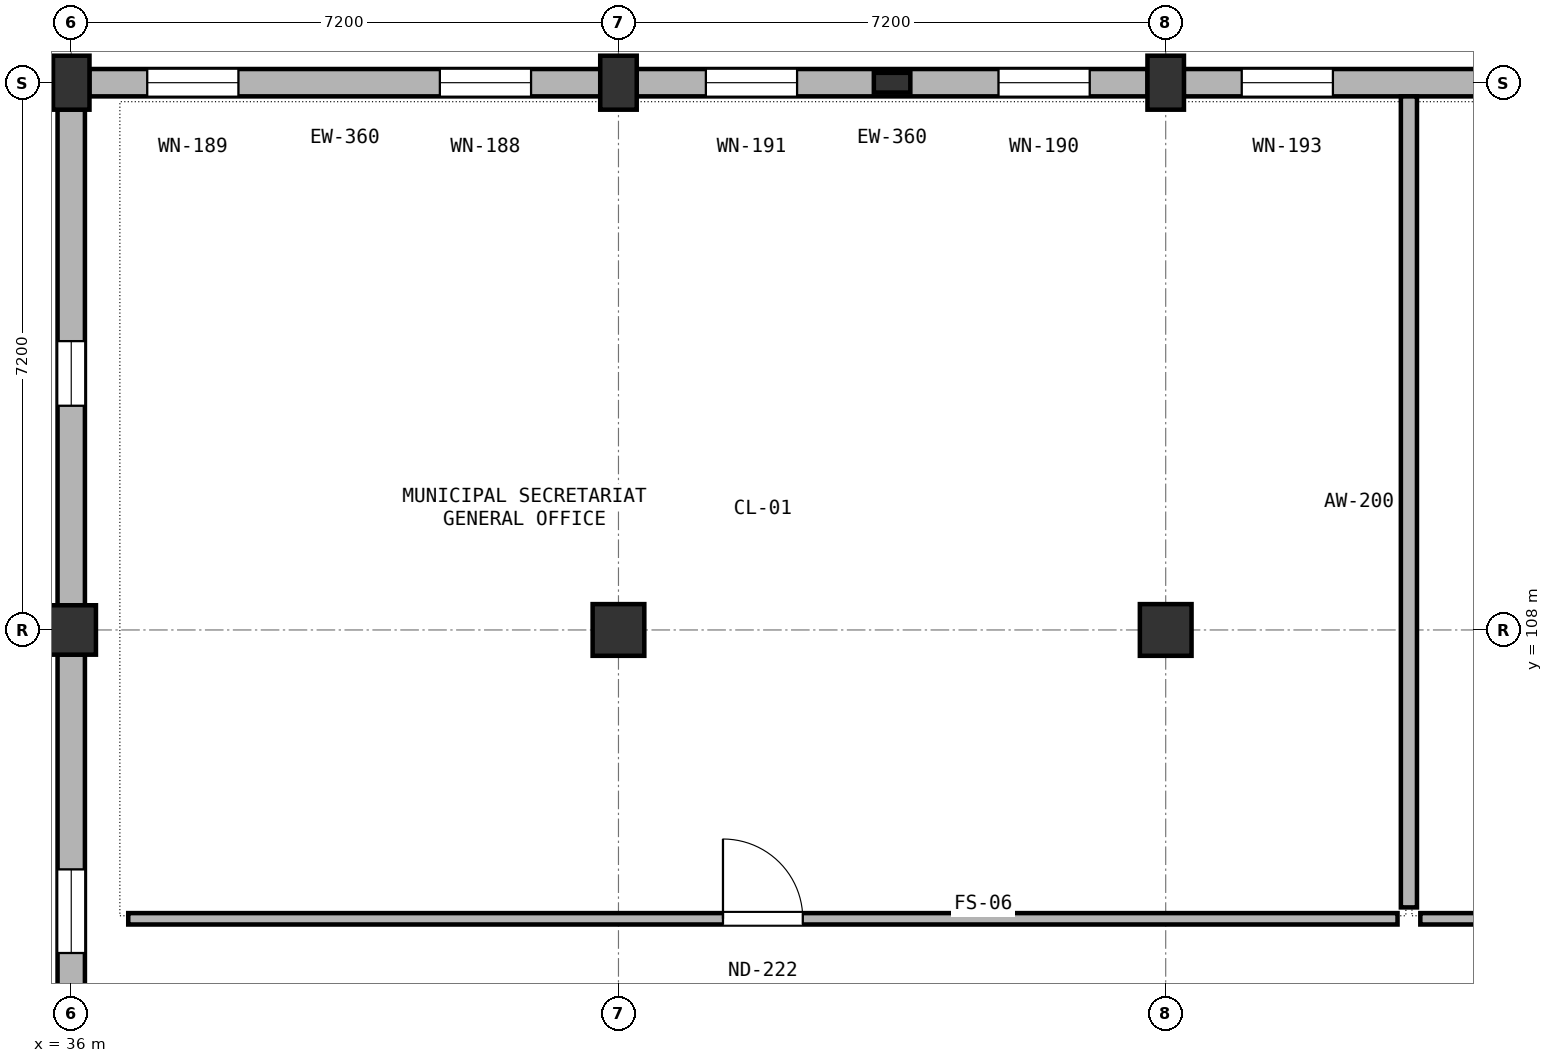
"""IFC4 building model, lengths in metres.
Left out: names, types, materials, properties, quantities, classifications, styles, units other than length and angle.
Written with IfcOpenShell. Run it as: python <this file> out.ifc"""

import sys

from ifc_helpers import new_model, si_unit, direction, frame, frame_2d, origin, origin_2d, place, context, subcontext, project, spatial, rectangle, extrude, element, fill, save


model = new_model("IFC4")
c1 = context("Model", 3, precision=1e-05, world=origin(), true_north=direction((0.0, 1.0)))
c2 = subcontext(c1, "Body", "Model", "MODEL_VIEW")
j1 = project(units=[si_unit("LENGTHUNIT", "METRE"), si_unit("PLANEANGLEUNIT", "RADIAN")], contexts=[c1])
p1 = place(None, origin())
s1 = spatial("IfcSite", under=j1, at=p1, CompositionType="ELEMENT")
p2 = place(p1, origin())
s2 = spatial("IfcBuilding", under=s1, at=p2, CompositionType="ELEMENT")
p3 = place(p2, frame((0.0, 0.0, 26.4)))
s3 = spatial("IfcBuildingStorey", under=s2, at=p3, CompositionType="ELEMENT", Elevation=26.4)
p4 = place(p3, frame((36.0, 108.0, 0.0), z_axis=(0.0, 0.0, 1.0), x_axis=(1.0, 0.0, 0.0)))
e1 = element("IfcColumn", 1, at=p4, inside=s3, PredefinedType="COLUMN", context=c2, shape_type="SweptSolid", body=[
    extrude(rectangle(XDim=0.65, YDim=0.65, at=origin_2d()), origin(), (0.0, 0.0, 1.0), 3.9),
])
p5 = place(p3, frame((36.0, 115.2, 0.0), z_axis=(0.0, 0.0, 1.0), x_axis=(1.0, 0.0, 0.0)))
e2 = element("IfcColumn", 2, at=p5, inside=s3, PredefinedType="COLUMN", context=c2, shape_type="SweptSolid", body=[
    extrude(rectangle(XDim=0.48, YDim=0.71, at=origin_2d()), origin(), (0.0, 0.0, 1.0), 3.9),
])
p6 = place(p3, frame((43.2, 108.0, 0.0), z_axis=(0.0, 0.0, 1.0), x_axis=(1.0, 0.0, 0.0)))
e3 = element("IfcColumn", 3, at=p6, inside=s3, PredefinedType="COLUMN", context=c2, shape_type="SweptSolid", body=[
    extrude(rectangle(XDim=0.68, YDim=0.68, at=origin_2d()), origin(), (0.0, 0.0, 1.0), 3.9),
])
p7 = place(p3, frame((43.2, 115.2, 0.0), z_axis=(0.0, 0.0, 1.0), x_axis=(1.0, 0.0, 0.0)))
e4 = element("IfcColumn", 4, at=p7, inside=s3, PredefinedType="COLUMN", context=c2, shape_type="SweptSolid", body=[
    extrude(rectangle(XDim=0.48, YDim=0.71, at=origin_2d()), origin(), (0.0, 0.0, 1.0), 3.9),
])
p8 = place(p3, frame((50.4, 108.0, 0.0), z_axis=(0.0, 0.0, 1.0), x_axis=(1.0, 0.0, 0.0)))
e5 = element("IfcColumn", 5, at=p8, inside=s3, PredefinedType="COLUMN", context=c2, shape_type="SweptSolid", body=[
    extrude(rectangle(XDim=0.68, YDim=0.68, at=origin_2d()), origin(), (0.0, 0.0, 1.0), 3.9),
])
p9 = place(p3, frame((50.4, 115.2, 0.0), z_axis=(0.0, 0.0, 1.0), x_axis=(1.0, 0.0, 0.0)))
e6 = element("IfcColumn", 6, at=p9, inside=s3, PredefinedType="COLUMN", context=c2, shape_type="SweptSolid", body=[
    extrude(rectangle(XDim=0.48, YDim=0.71, at=origin_2d()), origin(), (0.0, 0.0, 1.0), 3.9),
])
p10 = place(p3, frame((46.8, 115.2, 0.0), z_axis=(0.0, 0.0, 1.0), x_axis=(1.0, 0.0, 0.0)))
e7 = element("IfcColumn", 7, at=p10, inside=s3, PredefinedType="PILASTER", context=c2, shape_type="SweptSolid", body=[
    extrude(rectangle(XDim=0.48, YDim=0.26, at=origin_2d()), origin(), (0.0, 0.0, 1.0), 3.9),
])
p11 = place(p3, frame((42.962, 115.2, 0.0), z_axis=(0.0, 0.0, 1.0), x_axis=(-1.0, 0.0, 0.0)))
e8 = element("IfcWall", 8, at=p11, inside=s3, PredefinedType="SOLIDWALL", context=c2, shape_type="SweptSolid", body=[
    extrude(rectangle(XDim=6.724, YDim=0.36, at=frame_2d((3.362, 0.0))), origin(), (0.0, 0.0, 1.0), 2.74),
])
p12 = place(p11, frame((0.912, 0.0, 0.7)))
e9 = element("IfcOpeningElement", 9, at=p12, cuts=e8, PredefinedType="OPENING", context=c2, shape_type="SweptSolid", body=[
    extrude(rectangle(XDim=1.2, YDim=1.84, at=frame_2d((0.6, 0.92))), frame((0.0, 0.19, 0.0), z_axis=(0.0, -1.0, 0.0), x_axis=(1.0, 0.0, 0.0)), (0.0, 0.0, 1.0), 0.38),
])
p13 = place(p11, frame((4.762, 0.0, 0.7)))
e10 = element("IfcOpeningElement", 10, at=p13, cuts=e8, PredefinedType="OPENING", context=c2, shape_type="SweptSolid", body=[
    extrude(rectangle(XDim=1.2, YDim=1.84, at=frame_2d((0.6, 0.92))), frame((0.0, 0.19, 0.0), z_axis=(0.0, -1.0, 0.0), x_axis=(1.0, 0.0, 0.0)), (0.0, 0.0, 1.0), 0.38),
])
p14 = place(p3, frame((50.162, 115.2, 0.0), z_axis=(0.0, 0.0, 1.0), x_axis=(-1.0, 0.0, 0.0)))
e11 = element("IfcWall", 11, at=p14, inside=s3, PredefinedType="SOLIDWALL", context=c2, shape_type="SweptSolid", body=[
    extrude(rectangle(XDim=6.724, YDim=0.36, at=frame_2d((3.362, 0.0))), origin(), (0.0, 0.0, 1.0), 2.74),
])
p15 = place(p14, frame((0.762, 0.0, 0.7)))
e12 = element("IfcOpeningElement", 12, at=p15, cuts=e11, PredefinedType="OPENING", context=c2, shape_type="SweptSolid", body=[
    extrude(rectangle(XDim=1.2, YDim=1.84, at=frame_2d((0.6, 0.92))), frame((0.0, 0.19, 0.0), z_axis=(0.0, -1.0, 0.0), x_axis=(1.0, 0.0, 0.0)), (0.0, 0.0, 1.0), 0.38),
])
p16 = place(p14, frame((4.612, 0.0, 0.7)))
e13 = element("IfcOpeningElement", 13, at=p16, cuts=e11, PredefinedType="OPENING", context=c2, shape_type="SweptSolid", body=[
    extrude(rectangle(XDim=1.2, YDim=1.84, at=frame_2d((0.6, 0.92))), frame((0.0, 0.19, 0.0), z_axis=(0.0, -1.0, 0.0), x_axis=(1.0, 0.0, 0.0)), (0.0, 0.0, 1.0), 0.38),
])
p17 = place(p3, frame((57.362, 115.2, 0.0), z_axis=(0.0, 0.0, 1.0), x_axis=(-1.0, 0.0, 0.0)))
e14 = element("IfcWall", 14, at=p17, inside=s3, PredefinedType="SOLIDWALL", context=c2, shape_type="SweptSolid", body=[
    extrude(rectangle(XDim=6.724, YDim=0.36, at=frame_2d((3.362, 0.0))), origin(), (0.0, 0.0, 1.0), 2.74),
])
p18 = place(p17, frame((0.912, 0.0, 0.7)))
e15 = element("IfcOpeningElement", 15, at=p18, cuts=e14, PredefinedType="OPENING", context=c2, shape_type="SweptSolid", body=[
    extrude(rectangle(XDim=1.2, YDim=1.84, at=frame_2d((0.6, 0.92))), frame((0.0, 0.19, 0.0), z_axis=(0.0, -1.0, 0.0), x_axis=(1.0, 0.0, 0.0)), (0.0, 0.0, 1.0), 0.38),
])
p19 = place(p17, frame((4.762, 0.0, 0.7)))
e16 = element("IfcOpeningElement", 16, at=p19, cuts=e14, PredefinedType="OPENING", context=c2, shape_type="SweptSolid", body=[
    extrude(rectangle(XDim=1.2, YDim=1.84, at=frame_2d((0.6, 0.92))), frame((0.0, 0.19, 0.0), z_axis=(0.0, -1.0, 0.0), x_axis=(1.0, 0.0, 0.0)), (0.0, 0.0, 1.0), 0.38),
])
p20 = place(p3, frame((36.0, 101.123, 0.0), z_axis=(0.0, 0.0, 1.0), x_axis=(0.0, 1.0, 0.0)))
e17 = element("IfcWall", 17, at=p20, inside=s3, PredefinedType="SOLIDWALL", context=c2, shape_type="SweptSolid", body=[
    extrude(rectangle(XDim=6.554, YDim=0.36, at=frame_2d((3.277, 0.0))), origin(), (0.0, 0.0, 1.0), 2.74),
])
p21 = place(p20, frame((2.627, 0.0, 0.7)))
e18 = element("IfcOpeningElement", 18, at=p21, cuts=e17, PredefinedType="OPENING", context=c2, shape_type="SweptSolid", body=[
    extrude(rectangle(XDim=1.1, YDim=1.89, at=frame_2d((0.55, 0.945))), frame((0.0, 0.19, 0.0), z_axis=(0.0, -1.0, 0.0), x_axis=(1.0, 0.0, 0.0)), (0.0, 0.0, 1.0), 0.38),
])
p22 = place(p3, frame((36.0, 108.323, 0.0), z_axis=(0.0, 0.0, 1.0), x_axis=(0.0, 1.0, 0.0)))
e19 = element("IfcWall", 19, at=p22, inside=s3, PredefinedType="SOLIDWALL", context=c2, shape_type="SweptSolid", body=[
    extrude(rectangle(XDim=6.524, YDim=0.36, at=frame_2d((3.262, 0.0))), origin(), (0.0, 0.0, 1.0), 2.74),
])
p23 = place(p22, frame((2.627, 0.0, 0.7)))
e20 = element("IfcOpeningElement", 20, at=p23, cuts=e19, PredefinedType="OPENING", context=c2, shape_type="SweptSolid", body=[
    extrude(rectangle(XDim=0.85, YDim=1.89, at=frame_2d((0.425, 0.945))), frame((0.0, 0.19, 0.0), z_axis=(0.0, -1.0, 0.0), x_axis=(1.0, 0.0, 0.0)), (0.0, 0.0, 1.0), 0.38),
])
p24 = place(p3, frame((36.75, 104.2, 0.0), z_axis=(0.0, 0.0, 1.0), x_axis=(1.0, 0.0, 0.0)))
e21 = element("IfcWall", 21, at=p24, inside=s3, PredefinedType="PARTITIONING", context=c2, shape_type="SweptSolid", body=[
    extrude(rectangle(XDim=16.7, YDim=0.15, at=frame_2d((8.35, 0.0))), origin(), (0.0, 0.0, 1.0), 2.78),
])
p25 = place(p24, frame((7.825, 0.0, 0.0)))
e22 = element("IfcOpeningElement", 22, at=p25, cuts=e21, PredefinedType="OPENING", context=c2, shape_type="SweptSolid", body=[
    extrude(rectangle(XDim=1.05, YDim=2.15, at=frame_2d((0.525, 1.075))), frame((0.0, 0.085, 0.0), z_axis=(0.0, -1.0, 0.0), x_axis=(1.0, 0.0, 0.0)), (0.0, 0.0, 1.0), 0.17),
])
p26 = place(p3, frame((53.75, 104.2, 0.0), z_axis=(0.0, 0.0, 1.0), x_axis=(1.0, 0.0, 0.0)))
e23 = element("IfcWall", 23, at=p26, inside=s3, PredefinedType="PARTITIONING", context=c2, shape_type="SweptSolid", body=[
    extrude(rectangle(XDim=16.1, YDim=0.15, at=frame_2d((8.05, 0.0))), origin(), (0.0, 0.0, 1.0), 2.78),
])
p27 = place(p26, frame((7.35, 0.0, 0.0)))
e24 = element("IfcOpeningElement", 24, at=p27, cuts=e23, PredefinedType="OPENING", context=c2, shape_type="SweptSolid", body=[
    extrude(rectangle(XDim=1.4, YDim=2.2, at=frame_2d((0.7, 1.1))), frame((0.0, 0.085, 0.0), z_axis=(0.0, -1.0, 0.0), x_axis=(1.0, 0.0, 0.0)), (0.0, 0.0, 1.0), 0.17),
])
p28 = place(p3, frame((53.6, 104.35, 0.0), z_axis=(0.0, 0.0, 1.0), x_axis=(0.0, 1.0, 0.0)))
e25 = element("IfcWall", 25, at=p28, inside=s3, PredefinedType="PARTITIONING", context=c2, shape_type="SweptSolid", body=[
    extrude(rectangle(XDim=10.67, YDim=0.212, at=frame_2d((5.335, 0.0))), origin(), (0.0, 0.0, 1.0), 2.78),
])
p29 = place(p12, origin())
e26 = element("IfcWindow", 26, at=p29, inside=s3, PartitioningType="DOUBLE_PANEL_VERTICAL", PredefinedType="WINDOW", context=c2, shape_type="SweptSolid", body=[
    extrude(rectangle(XDim=1.2, YDim=1.84, at=frame_2d((0.6, 0.92))), frame((0.0, 0.03, 0.0), z_axis=(0.0, -1.0, 0.0), x_axis=(1.0, 0.0, 0.0)), (0.0, 0.0, 1.0), 0.06),
])
fill(e9, e26)
p30 = place(p13, origin())
e27 = element("IfcWindow", 27, at=p30, inside=s3, PartitioningType="DOUBLE_PANEL_VERTICAL", PredefinedType="WINDOW", context=c2, shape_type="SweptSolid", body=[
    extrude(rectangle(XDim=1.2, YDim=1.84, at=frame_2d((0.6, 0.92))), frame((0.0, 0.03, 0.0), z_axis=(0.0, -1.0, 0.0), x_axis=(1.0, 0.0, 0.0)), (0.0, 0.0, 1.0), 0.06),
])
fill(e10, e27)
p31 = place(p15, origin())
e28 = element("IfcWindow", 28, at=p31, inside=s3, PartitioningType="DOUBLE_PANEL_VERTICAL", PredefinedType="WINDOW", context=c2, shape_type="SweptSolid", body=[
    extrude(rectangle(XDim=1.2, YDim=1.84, at=frame_2d((0.6, 0.92))), frame((0.0, 0.03, 0.0), z_axis=(0.0, -1.0, 0.0), x_axis=(1.0, 0.0, 0.0)), (0.0, 0.0, 1.0), 0.06),
])
fill(e12, e28)
p32 = place(p16, origin())
e29 = element("IfcWindow", 29, at=p32, inside=s3, PartitioningType="DOUBLE_PANEL_VERTICAL", PredefinedType="WINDOW", context=c2, shape_type="SweptSolid", body=[
    extrude(rectangle(XDim=1.2, YDim=1.84, at=frame_2d((0.6, 0.92))), frame((0.0, 0.03, 0.0), z_axis=(0.0, -1.0, 0.0), x_axis=(1.0, 0.0, 0.0)), (0.0, 0.0, 1.0), 0.06),
])
fill(e13, e29)
p33 = place(p19, origin())
e30 = element("IfcWindow", 30, at=p33, inside=s3, PartitioningType="DOUBLE_PANEL_VERTICAL", PredefinedType="WINDOW", context=c2, shape_type="SweptSolid", body=[
    extrude(rectangle(XDim=1.2, YDim=1.84, at=frame_2d((0.6, 0.92))), frame((0.0, 0.03, 0.0), z_axis=(0.0, -1.0, 0.0), x_axis=(1.0, 0.0, 0.0)), (0.0, 0.0, 1.0), 0.06),
])
fill(e16, e30)
p34 = place(p21, origin())
e31 = element("IfcWindow", 31, at=p34, inside=s3, PartitioningType="SINGLE_PANEL", PredefinedType="WINDOW", context=c2, shape_type="SweptSolid", body=[
    extrude(rectangle(XDim=1.1, YDim=1.89, at=frame_2d((0.55, 0.945))), frame((0.0, 0.03, 0.0), z_axis=(0.0, -1.0, 0.0), x_axis=(1.0, 0.0, 0.0)), (0.0, 0.0, 1.0), 0.06),
])
fill(e18, e31)
p35 = place(p23, origin())
e32 = element("IfcWindow", 32, at=p35, inside=s3, PartitioningType="SINGLE_PANEL", PredefinedType="WINDOW", context=c2, shape_type="SweptSolid", body=[
    extrude(rectangle(XDim=0.85, YDim=1.89, at=frame_2d((0.425, 0.945))), frame((0.0, 0.03, 0.0), z_axis=(0.0, -1.0, 0.0), x_axis=(1.0, 0.0, 0.0)), (0.0, 0.0, 1.0), 0.06),
])
fill(e20, e32)
p36 = place(p25, origin())
e33 = element("IfcDoor", 33, at=p36, inside=s3, OperationType="SINGLE_SWING_LEFT", PredefinedType="DOOR", context=c2, shape_type="SweptSolid", body=[
    extrude(rectangle(XDim=1.05, YDim=2.15, at=frame_2d((0.525, 1.075))), frame((0.0, 0.025, 0.0), z_axis=(0.0, -1.0, 0.0), x_axis=(1.0, 0.0, 0.0)), (0.0, 0.0, 1.0), 0.05),
])
fill(e22, e33)
save(model, sys.argv[1])
